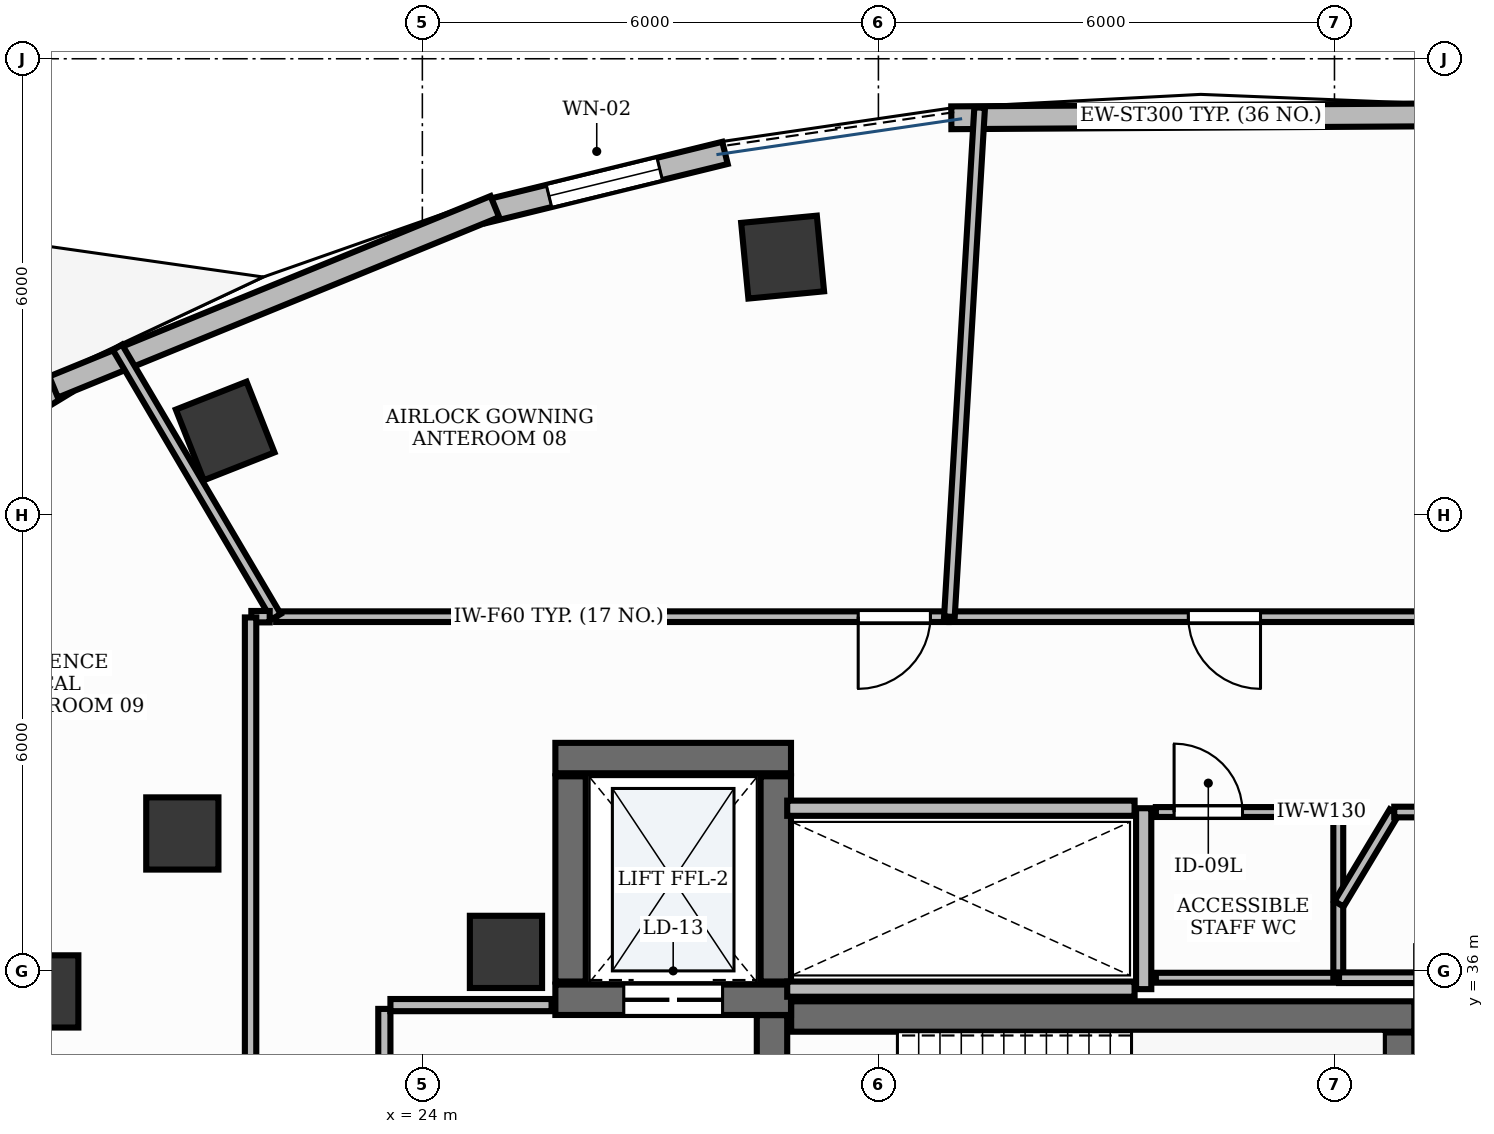
"""IFC4 building model, lengths in metres.
Left out: names, types, materials, properties, quantities, classifications, styles, units other than length and angle.
Written with IfcOpenShell. Run it as: python <this file> out.ifc"""

import sys

from ifc_helpers import new_model, si_unit, direction, frame, frame_2d, origin, origin_2d, place, context, subcontext, project, spatial, rectangle, extrude, element, fill, save


model = new_model("IFC4")
c1 = context("Model", 3, precision=1e-05, world=origin(), true_north=direction((0.0, 1.0)))
c2 = subcontext(c1, "Body", "Model", "MODEL_VIEW")
j1 = project(units=[si_unit("LENGTHUNIT", "METRE"), si_unit("PLANEANGLEUNIT", "RADIAN")], contexts=[c1])
p1 = place(None, origin())
s1 = spatial("IfcSite", under=j1, at=p1, CompositionType="ELEMENT")
p2 = place(p1, origin())
s2 = spatial("IfcBuilding", under=s1, at=p2, CompositionType="ELEMENT")
p3 = place(p2, frame((0.0, 0.0, 192.0)))
s3 = spatial("IfcBuildingStorey", under=s2, at=p3, CompositionType="ELEMENT", Elevation=192.0)
p4 = place(p3, frame((28.852, 35.4, 0.0), z_axis=(0.0, 0.0, 1.0), x_axis=(1.0, 0.0, 0.0)))
e1 = element("IfcWall", 1, at=p4, inside=s3, PredefinedType="SHEAR", context=c2, shape_type="SweptSolid", body=[
    extrude(rectangle(XDim=8.198, YDim=0.4, at=frame_2d((4.099, 0.0))), origin(), (0.0, 0.0, 1.0), 3.9),
])
p5 = place(p3, frame((36.85, 32.11, 0.0), z_axis=(0.0, 0.0, 1.0), x_axis=(0.0, 1.0, 0.0)))
e2 = element("IfcWall", 2, at=p5, inside=s3, PredefinedType="SHEAR", context=c2, shape_type="SweptSolid", body=[
    extrude(rectangle(XDim=3.08, YDim=0.4, at=frame_2d((1.54, 0.0))), origin(), (0.0, 0.0, 1.0), 3.9),
])
p6 = place(p3, frame((28.6, 32.11, 0.0), z_axis=(0.0, 0.0, 1.0), x_axis=(0.0, 1.0, 0.0)))
e3 = element("IfcWall", 3, at=p6, inside=s3, PredefinedType="SHEAR", context=c2, shape_type="SweptSolid", body=[
    extrude(rectangle(XDim=3.308, YDim=0.4, at=frame_2d((1.654, 0.0))), origin(), (0.0, 0.0, 1.0), 3.9),
])
p7 = place(p6, frame((0.2, 0.0, 0.0)))
e4 = element("IfcOpeningElement", 4, at=p7, cuts=e3, PredefinedType="OPENING", context=c2, shape_type="SweptSolid", body=[
    extrude(rectangle(XDim=1.05, YDim=2.15, at=frame_2d((0.525, 1.075))), frame((0.0, 0.215, 0.0), z_axis=(0.0, -1.0, 0.0), x_axis=(1.0, 0.0, 0.0)), (0.0, 0.0, 1.0), 0.43),
])
p8 = place(p3, frame((25.75, 38.8, 0.0), z_axis=(0.0, 0.0, 1.0), x_axis=(1.0, 0.0, 0.0)))
e5 = element("IfcWall", 5, at=p8, inside=s3, PredefinedType="SHEAR", context=c2, shape_type="SweptSolid", body=[
    extrude(rectangle(XDim=3.1, YDim=0.4, at=frame_2d((1.55, 0.0))), origin(), (0.0, 0.0, 1.0), 3.9),
])
p9 = place(p3, frame((25.75, 35.62, 0.0), z_axis=(0.0, 0.0, 1.0), x_axis=(1.0, 0.0, 0.0)))
e6 = element("IfcWall", 6, at=p9, inside=s3, PredefinedType="SHEAR", context=c2, shape_type="SweptSolid", body=[
    extrude(rectangle(XDim=3.1, YDim=0.4, at=frame_2d((1.55, 0.0))), origin(), (0.0, 0.0, 1.0), 3.9),
])
p10 = place(p9, frame((0.9, 0.0, 0.0)))
e7 = element("IfcOpeningElement", 7, at=p10, cuts=e6, PredefinedType="OPENING", context=c2, shape_type="SweptSolid", body=[
    extrude(rectangle(XDim=1.3, YDim=2.2, at=frame_2d((0.65, 1.1))), frame((0.0, 0.215, 0.0), z_axis=(0.0, -1.0, 0.0), x_axis=(1.0, 0.0, 0.0)), (0.0, 0.0, 1.0), 0.43),
])
for number, where, z_axis, x_axis in (
    (8, (25.95, 35.86, 0.0), (0.0, 0.0, 1.0), (0.0, 1.0, 0.0)),
    (9, (28.65, 35.86, 0.0), (0.0, 0.0, 1.0), (0.0, 1.0, 0.0)),
):
    element("IfcWall", number, at=place(p3, frame(where, z_axis=z_axis, x_axis=x_axis)), inside=s3, PredefinedType="SHEAR", context=c2, shape_type="SweptSolid", body=[
        extrude(rectangle(XDim=2.7, YDim=0.4, at=frame_2d((1.35, 0.0))), origin(), (0.0, 0.0, 1.0), 3.9),
    ])
p11 = place(p3, frame((25.1, 36.25, -0.0), z_axis=(0.0, 0.0, 1.0), x_axis=(1.0, 0.0, 0.0)))
e10 = element("IfcColumn", 10, at=p11, inside=s3, PredefinedType="PILASTER", context=c2, shape_type="SweptSolid", body=[
    extrude(rectangle(XDim=0.95, YDim=0.95, at=origin_2d()), origin(), (0.0, 0.0, 1.0), 3.901),
])
for number, where, z_axis, x_axis in (
    (11, (28.74, 45.39, -0.0), (0.0, 0.0, 1.0), (0.995, 0.095, 0.0)),
    (12, (21.406, 43.103, -0.0), (0.0, 0.0, 1.0), (0.93, 0.367, 0.0)),
):
    element("IfcColumn", number, at=place(p3, frame(where, z_axis=z_axis, x_axis=x_axis)), inside=s3, PredefinedType="COLUMN", context=c2, shape_type="SweptSolid", body=[
        extrude(rectangle(XDim=1.0, YDim=1.0, at=origin_2d()), origin(), (0.0, 0.0, 1.0), 3.901),
    ])
for number, where, z_axis, x_axis in (
    (13, (20.842, 37.808, -0.0), (0.0, 0.0, 1.0), (1.0, 0.0, 0.0)),
    (14, (19.0, 35.73, -0.0), (0.0, 0.0, 1.0), (1.0, 0.0, 0.0)),
):
    element("IfcColumn", number, at=place(p3, frame(where, z_axis=z_axis, x_axis=x_axis)), inside=s3, PredefinedType="COLUMN", context=c2, shape_type="SweptSolid", body=[
        extrude(rectangle(XDim=0.95, YDim=0.95, at=origin_2d()), origin(), (0.0, 0.0, 1.0), 3.901),
    ])
p12 = place(p3, frame((27.982, 46.762, 0.0), z_axis=(0.0, 0.0, 1.0), x_axis=(-0.971312804689, -0.237805457142, 0.0)))
e15 = element("IfcWall", 15, at=p12, inside=s3, PredefinedType="STANDARD", context=c2, shape_type="SweptSolid", body=[
    extrude(rectangle(XDim=3.269, YDim=0.3, at=frame_2d((1.634, 0.0))), origin(), (0.0, 0.0, 1.0), 3.9),
])
p13 = place(p12, frame((0.885, 0.0, 0.95)))
e16 = element("IfcOpeningElement", 16, at=p13, cuts=e15, PredefinedType="OPENING", context=c2, shape_type="SweptSolid", body=[
    extrude(rectangle(XDim=1.5, YDim=1.8, at=frame_2d((0.75, 0.9))), frame((0.0, 0.165, 0.0), z_axis=(0.0, -1.0, 0.0), x_axis=(1.0, 0.0, 0.0)), (0.0, 0.0, 1.0), 0.33),
])
p14 = place(p3, frame((19.303, 43.736, 0.0), z_axis=(0.0, 0.0, 1.0), x_axis=(-0.85455658592, -0.519358297769, 0.0)))
e17 = element("IfcWall", 17, at=p14, inside=s3, PredefinedType="STANDARD", context=c2, shape_type="SweptSolid", body=[
    extrude(rectangle(XDim=3.066, YDim=0.3, at=frame_2d((1.533, 0.0))), origin(), (0.0, 0.0, 1.0), 3.9),
])
p15 = place(p14, frame((0.983, 0.0, 0.0)))
e18 = element("IfcOpeningElement", 18, at=p15, cuts=e17, PredefinedType="OPENING", context=c2, shape_type="SweptSolid", body=[
    extrude(rectangle(XDim=1.1, YDim=2.15, at=frame_2d((0.55, 1.075))), frame((0.0, 0.165, 0.0), z_axis=(0.0, -1.0, 0.0), x_axis=(1.0, 0.0, 0.0)), (0.0, 0.0, 1.0), 0.33),
])
p16 = place(p3, frame((37.527, 47.263, 0.0), z_axis=(0.0, 0.0, 1.0), x_axis=(-0.999982312698, -0.005947629086, 0.0)))
e19 = element("IfcWall", 19, at=p16, inside=s3, PredefinedType="STANDARD", context=c2, shape_type="SweptSolid", body=[
    extrude(rectangle(XDim=6.568, YDim=0.3, at=frame_2d((3.284, 0.0))), origin(), (0.0, 0.0, 1.0), 3.47),
])
p17 = place(p3, frame((24.954, 46.055, 0.0), z_axis=(0.0, 0.0, 1.0), x_axis=(-0.925664098805, -0.378346370648, 0.0)))
e20 = element("IfcWall", 20, at=p17, inside=s3, PredefinedType="STANDARD", context=c2, shape_type="SweptSolid", body=[
    extrude(rectangle(XDim=6.272, YDim=0.3, at=frame_2d((3.136, 0.0))), origin(), (0.0, 0.0, 1.0), 3.9),
])
p18 = place(p3, frame((33.49, 35.76, 0.0), z_axis=(0.0, 0.0, 1.0), x_axis=(0.0, 1.0, 0.0)))
e21 = element("IfcWall", 21, at=p18, inside=s3, PredefinedType="PARTITIONING", context=c2, shape_type="SweptSolid", body=[
    extrude(rectangle(XDim=2.38, YDim=0.2, at=frame_2d((1.19, 0.0))), origin(), (0.0, 0.0, 1.0), 2.91),
])
for number, where, z_axis, x_axis in (
    (22, (28.8, 35.76, 0.0), (0.0, 0.0, 1.0), (1.0, 0.0, 0.0)),
    (23, (28.8, 38.14, 0.0), (0.0, 0.0, 1.0), (1.0, 0.0, 0.0)),
):
    element("IfcWall", number, at=place(p3, frame(where, z_axis=z_axis, x_axis=x_axis)), inside=s3, PredefinedType="PARTITIONING", context=c2, shape_type="SweptSolid", body=[
        extrude(rectangle(XDim=4.57, YDim=0.2, at=frame_2d((2.285, 0.0))), origin(), (0.0, 0.0, 1.0), 2.91),
    ])
p19 = place(p3, frame((23.5, 32.1, 0.0), z_axis=(0.0, 0.0, 1.0), x_axis=(0.0, 1.0, 0.0)))
e24 = element("IfcWall", 24, at=p19, inside=s3, PredefinedType="PARTITIONING", context=c2, shape_type="SweptSolid", body=[
    extrude(rectangle(XDim=3.4, YDim=0.16, at=frame_2d((1.7, 0.0))), origin(), (0.0, 0.0, 1.0), 2.91),
])
p20 = place(p19, frame((1.175, 0.0, 0.0)))
e25 = element("IfcOpeningElement", 25, at=p20, cuts=e24, PredefinedType="OPENING", context=c2, shape_type="SweptSolid", body=[
    extrude(rectangle(XDim=1.05, YDim=2.15, at=frame_2d((0.525, 1.075))), frame((0.0, 0.095, 0.0), z_axis=(0.0, -1.0, 0.0), x_axis=(1.0, 0.0, 0.0)), (0.0, 0.0, 1.0), 0.19),
])
p21 = place(p3, frame((23.58, 35.55, 0.0), z_axis=(0.0, 0.0, 1.0), x_axis=(1.0, 0.0, 0.0)))
e26 = element("IfcWall", 26, at=p21, inside=s3, PredefinedType="PARTITIONING", context=c2, shape_type="SweptSolid", body=[
    extrude(rectangle(XDim=2.12, YDim=0.16, at=frame_2d((1.06, 0.0))), origin(), (0.0, 0.0, 1.0), 2.91),
])
p22 = place(p3, frame((33.65, 38.09, 0.0), z_axis=(0.0, 0.0, 1.0), x_axis=(1.0, 0.0, 0.0)))
e27 = element("IfcWall", 27, at=p22, inside=s3, PredefinedType="PARTITIONING", context=c2, shape_type="SweptSolid", body=[
    extrude(rectangle(XDim=2.4, YDim=0.13, at=frame_2d((1.2, 0.0))), origin(), (0.0, 0.0, 1.0), 2.91),
])
p23 = place(p22, frame((0.24, 0.0, 0.0)))
e28 = element("IfcOpeningElement", 28, at=p23, cuts=e27, PredefinedType="OPENING", context=c2, shape_type="SweptSolid", body=[
    extrude(rectangle(XDim=0.9, YDim=2.15, at=frame_2d((0.45, 1.075))), frame((0.0, 0.08, 0.0), z_axis=(0.0, -1.0, 0.0), x_axis=(1.0, 0.0, 0.0)), (0.0, 0.0, 1.0), 0.16),
])
p24 = place(p3, frame((37.2, 40.66, 0.0), z_axis=(0.0, 0.0, 1.0), x_axis=(-1.0, 0.0, 0.0)))
e29 = element("IfcWall", 29, at=p24, inside=s3, PredefinedType="PARTITIONING", context=c2, shape_type="SweptSolid", body=[
    extrude(rectangle(XDim=6.266, YDim=0.14, at=frame_2d((3.133, 0.0))), origin(), (0.0, 0.0, 1.0), 2.91),
])
p25 = place(p24, frame((2.173, 0.0, 0.0)))
e30 = element("IfcOpeningElement", 30, at=p25, cuts=e29, PredefinedType="OPENING", context=c2, shape_type="SweptSolid", body=[
    extrude(rectangle(XDim=0.95, YDim=2.15, at=frame_2d((0.475, 1.075))), frame((0.0, 0.085, 0.0), z_axis=(0.0, -1.0, 0.0), x_axis=(1.0, 0.0, 0.0)), (0.0, 0.0, 1.0), 0.17),
])
p26 = place(p3, frame((30.924, 40.66, 0.0), z_axis=(0.0, 0.0, 1.0), x_axis=(-1.0, 0.0, 0.0)))
e31 = element("IfcWall", 31, at=p26, inside=s3, PredefinedType="PARTITIONING", context=c2, shape_type="SweptSolid", body=[
    extrude(rectangle(XDim=8.848, YDim=0.14, at=frame_2d((4.424, 0.0))), origin(), (0.0, 0.0, 1.0), 2.91),
])
p27 = place(p26, frame((0.24, 0.0, 0.0)))
e32 = element("IfcOpeningElement", 32, at=p27, cuts=e31, PredefinedType="OPENING", context=c2, shape_type="SweptSolid", body=[
    extrude(rectangle(XDim=0.95, YDim=2.15, at=frame_2d((0.475, 1.075))), frame((0.0, 0.085, 0.0), z_axis=(0.0, -1.0, 0.0), x_axis=(1.0, 0.0, 0.0)), (0.0, 0.0, 1.0), 0.17),
])
p28 = place(p3, frame((36.05, 35.91, 0.0), z_axis=(0.0, 0.0, 1.0), x_axis=(-1.0, 0.0, 0.0)))
e33 = element("IfcWall", 33, at=p28, inside=s3, PredefinedType="PARTITIONING", context=c2, shape_type="SweptSolid", body=[
    extrude(rectangle(XDim=2.4, YDim=0.13, at=frame_2d((1.2, 0.0))), origin(), (0.0, 0.0, 1.0), 2.91),
])
p29 = place(p3, frame((36.05, 38.09, 0.0), z_axis=(0.0, 0.0, 1.0), x_axis=(0.0, -1.0, 0.0)))
e34 = element("IfcWall", 34, at=p29, inside=s3, PredefinedType="PARTITIONING", context=c2, shape_type="SweptSolid", body=[
    extrude(rectangle(XDim=2.18, YDim=0.13, at=frame_2d((1.09, 0.0))), origin(), (0.0, 0.0, 1.0), 2.91),
])
p30 = place(p3, frame((37.35, 35.91, 0.0), z_axis=(0.0, 0.0, 1.0), x_axis=(-1.0, 0.0, 0.0)))
e35 = element("IfcWall", 35, at=p30, inside=s3, PredefinedType="PARTITIONING", context=c2, shape_type="SweptSolid", body=[
    extrude(rectangle(XDim=1.29, YDim=0.14, at=frame_2d((0.645, 0.0))), origin(), (0.0, 0.0, 1.0), 2.91),
])
p31 = place(p3, frame((36.06, 36.881, 0.0), z_axis=(0.0, 0.0, 1.0), x_axis=(0.515055765628, 0.857156670798, 0.0)))
e36 = element("IfcWall", 36, at=p31, inside=s3, PredefinedType="PARTITIONING", context=c2, shape_type="SweptSolid", body=[
    extrude(rectangle(XDim=1.41, YDim=0.14, at=frame_2d((0.705, 0.0))), origin(), (0.0, 0.0, 1.0), 2.91),
])
p32 = place(p3, frame((36.786, 38.09, 0.0), z_axis=(0.0, 0.0, 1.0), x_axis=(1.0, 0.0, 0.0)))
e37 = element("IfcWall", 37, at=p32, inside=s3, PredefinedType="PARTITIONING", context=c2, shape_type="SweptSolid", body=[
    extrude(rectangle(XDim=0.414, YDim=0.14, at=frame_2d((0.207, 0.0))), origin(), (0.0, 0.0, 1.0), 2.91),
])
p33 = place(p3, frame((30.934, 40.66, 0.0), z_axis=(0.0, 0.0, 1.0), x_axis=(0.059274468421, 0.998241722928, 0.0)))
e38 = element("IfcWall", 38, at=p33, inside=s3, PredefinedType="PARTITIONING", context=c2, shape_type="SweptSolid", body=[
    extrude(rectangle(XDim=6.709, YDim=0.14, at=frame_2d((3.355, 0.0))), origin(), (0.0, 0.0, 1.0), 2.91),
])
p34 = place(p3, frame((22.076, 40.66, 0.0), z_axis=(0.0, 0.0, 1.0), x_axis=(-0.507538873586, 0.86162885966, 0.0)))
e39 = element("IfcWall", 39, at=p34, inside=s3, PredefinedType="PARTITIONING", context=c2, shape_type="SweptSolid", body=[
    extrude(rectangle(XDim=4.113, YDim=0.14, at=frame_2d((2.056, 0.0))), origin(), (0.0, 0.0, 1.0), 2.91),
])
p35 = place(p3, frame((21.992, 40.66, 0.0), z_axis=(0.0, 0.0, 1.0), x_axis=(-1.0, 0.0, 0.0)))
e40 = element("IfcWall", 40, at=p35, inside=s3, PredefinedType="PARTITIONING", context=c2, shape_type="SweptSolid", body=[
    extrude(rectangle(XDim=0.242, YDim=0.15, at=frame_2d((0.121, 0.0))), origin(), (0.0, 0.0, 1.0), 2.91),
])
p36 = place(p3, frame((21.74, 40.65, 0.0), z_axis=(0.0, 0.0, 1.0), x_axis=(0.0, -1.0, 0.0)))
e41 = element("IfcWall", 41, at=p36, inside=s3, PredefinedType="PARTITIONING", context=c2, shape_type="SweptSolid", body=[
    extrude(rectangle(XDim=5.85, YDim=0.15, at=frame_2d((2.925, 0.0))), origin(), (0.0, 0.0, 1.0), 2.91),
])
p37 = place(p13, origin())
e42 = element("IfcWindow", 42, at=p37, inside=s3, PartitioningType="DOUBLE_PANEL_VERTICAL", PredefinedType="WINDOW", context=c2, shape_type="SweptSolid", body=[
    extrude(rectangle(XDim=1.5, YDim=1.8, at=frame_2d((0.75, 0.9))), frame((0.0, 0.03, 0.0), z_axis=(0.0, -1.0, 0.0), x_axis=(1.0, 0.0, 0.0)), (0.0, 0.0, 1.0), 0.06),
])
fill(e16, e42)
p38 = place(p10, origin())
e43 = element("IfcDoor", 43, at=p38, inside=s3, OperationType="DOUBLE_DOOR_SLIDING", PredefinedType="DOOR", context=c2, shape_type="SweptSolid", body=[
    extrude(rectangle(XDim=1.3, YDim=2.2, at=frame_2d((0.65, 1.1))), frame((0.0, 0.025, 0.0), z_axis=(0.0, -1.0, 0.0), x_axis=(1.0, 0.0, 0.0)), (0.0, 0.0, 1.0), 0.05),
])
fill(e7, e43)
p39 = place(p23, origin())
e44 = element("IfcDoor", 44, at=p39, inside=s3, OperationType="SINGLE_SWING_LEFT", PredefinedType="DOOR", context=c2, shape_type="SweptSolid", body=[
    extrude(rectangle(XDim=0.9, YDim=2.15, at=frame_2d((0.45, 1.075))), frame((0.0, 0.025, 0.0), z_axis=(0.0, -1.0, 0.0), x_axis=(1.0, 0.0, 0.0)), (0.0, 0.0, 1.0), 0.05),
])
fill(e28, e44)
p40 = place(p25, origin())
e45 = element("IfcDoor", 45, at=p40, inside=s3, OperationType="SINGLE_SWING_LEFT", PredefinedType="DOOR", context=c2, shape_type="SweptSolid", body=[
    extrude(rectangle(XDim=0.95, YDim=2.15, at=frame_2d((0.475, 1.075))), frame((0.0, 0.025, 0.0), z_axis=(0.0, -1.0, 0.0), x_axis=(1.0, 0.0, 0.0)), (0.0, 0.0, 1.0), 0.05),
])
fill(e30, e45)
p41 = place(p27, origin())
e46 = element("IfcDoor", 46, at=p41, inside=s3, OperationType="SINGLE_SWING_RIGHT", PredefinedType="DOOR", context=c2, shape_type="SweptSolid", body=[
    extrude(rectangle(XDim=0.95, YDim=2.15, at=frame_2d((0.475, 1.075))), frame((0.0, 0.025, 0.0), z_axis=(0.0, -1.0, 0.0), x_axis=(1.0, 0.0, 0.0)), (0.0, 0.0, 1.0), 0.05),
])
fill(e32, e46)
save(model, sys.argv[1])
